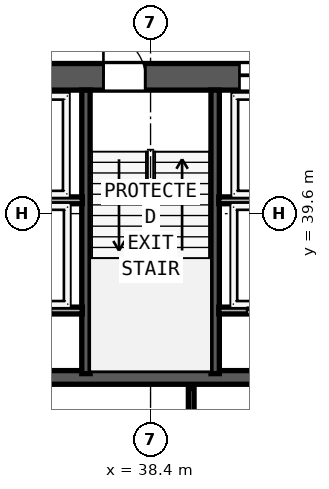
"""IFC4 building model, lengths in metres.
Left out: names, types, materials, properties, quantities, classifications, styles, units other than length and angle.
Written with IfcOpenShell. Run it as: python <this file> out.ifc"""

import sys

from ifc_helpers import new_model, si_unit, direction, frame, frame_2d, origin, place, context, subcontext, project, spatial, rectangle, extrude, element, fill, save


model = new_model("IFC4")
c1 = context("Model", 3, precision=1e-05, world=origin(), true_north=direction((0.0, 1.0)))
c2 = subcontext(c1, "Body", "Model", "MODEL_VIEW")
j1 = project(units=[si_unit("LENGTHUNIT", "METRE"), si_unit("PLANEANGLEUNIT", "RADIAN")], contexts=[c1])
p1 = place(None, origin())
s1 = spatial("IfcSite", under=j1, at=p1, CompositionType="ELEMENT")
p2 = place(p1, origin())
s2 = spatial("IfcBuilding", under=s1, at=p2, CompositionType="ELEMENT")
p3 = place(p2, frame((0.0, 0.0, 144.8)))
s3 = spatial("IfcBuildingStorey", under=s2, at=p3, CompositionType="ELEMENT", Elevation=144.8)
p4 = place(p3, frame((29.65, 43.2, 0.0), z_axis=(0.0, 0.0, 1.0), x_axis=(1.0, 0.0, 0.0)))
e1 = element("IfcWall", 1, at=p4, inside=s3, PredefinedType="SHEAR", context=c2, shape_type="SweptSolid", body=[
    extrude(rectangle(XDim=17.5, YDim=0.7, at=frame_2d((8.75, 0.0))), origin(), (0.0, 0.0, 1.0), 3.6),
])
p5 = place(p4, frame((2.4, 0.0, 0.0)))
e2 = element("IfcOpeningElement", 2, at=p5, cuts=e1, PredefinedType="OPENING", context=c2, shape_type="SweptSolid", body=[
    extrude(rectangle(XDim=1.1, YDim=2.15, at=frame_2d((0.55, 1.075))), frame((0.0, 0.36, 0.0), z_axis=(0.0, -1.0, 0.0), x_axis=(1.0, 0.0, 0.0)), (0.0, 0.0, 1.0), 0.72),
])
p6 = place(p4, frame((7.51, 0.0, 0.0)))
e3 = element("IfcOpeningElement", 3, at=p6, cuts=e1, PredefinedType="OPENING", context=c2, shape_type="SweptSolid", body=[
    extrude(rectangle(XDim=1.1, YDim=2.15, at=frame_2d((0.55, 1.075))), frame((0.0, 0.36, 0.0), z_axis=(0.0, -1.0, 0.0), x_axis=(1.0, 0.0, 0.0)), (0.0, 0.0, 1.0), 0.72),
])
p7 = place(p4, frame((13.6, 0.0, 0.0)))
e4 = element("IfcOpeningElement", 4, at=p7, cuts=e1, PredefinedType="OPENING", context=c2, shape_type="SweptSolid", body=[
    extrude(rectangle(XDim=1.1, YDim=2.15, at=frame_2d((0.55, 1.075))), frame((0.0, 0.36, 0.0), z_axis=(0.0, -1.0, 0.0), x_axis=(1.0, 0.0, 0.0)), (0.0, 0.0, 1.0), 0.72),
])
p8 = place(p4, frame((4.73, 0.0, 0.0)))
e5 = element("IfcOpeningElement", 5, at=p8, cuts=e1, PredefinedType="OPENING", context=c2, shape_type="SweptSolid", body=[
    extrude(rectangle(XDim=1.1, YDim=2.2, at=frame_2d((0.55, 1.1))), frame((0.0, 0.36, 0.0), z_axis=(0.0, -1.0, 0.0), x_axis=(1.0, 0.0, 0.0)), (0.0, 0.0, 1.0), 0.72),
])
p9 = place(p4, frame((11.09, 0.0, 0.0)))
e6 = element("IfcOpeningElement", 6, at=p9, cuts=e1, PredefinedType="OPENING", context=c2, shape_type="SweptSolid", body=[
    extrude(rectangle(XDim=1.1, YDim=2.2, at=frame_2d((0.55, 1.1))), frame((0.0, 0.36, 0.0), z_axis=(0.0, -1.0, 0.0), x_axis=(1.0, 0.0, 0.0)), (0.0, 0.0, 1.0), 0.72),
])
p10 = place(p3, frame((30.35, 35.29, 0.0), z_axis=(0.0, 0.0, 1.0), x_axis=(1.0, 0.0, 0.0)))
e7 = element("IfcWall", 7, at=p10, inside=s3, PredefinedType="SHEAR", context=c2, shape_type="SweptSolid", body=[
    extrude(rectangle(XDim=16.1, YDim=0.36, at=frame_2d((8.05, 0.0))), origin(), (0.0, 0.0, 1.0), 3.6),
])
p11 = place(p10, frame((5.0, 0.0, 0.0), z_axis=(0.0, 0.0, 1.0), x_axis=(-1.0, 0.0, 0.0)))
e8 = element("IfcOpeningElement", 8, at=p11, cuts=e7, PredefinedType="OPENING", context=c2, shape_type="SweptSolid", body=[
    extrude(rectangle(XDim=0.9, YDim=2.1, at=frame_2d((0.45, 1.05))), frame((0.0, 0.19, 0.0), z_axis=(0.0, -1.0, 0.0), x_axis=(1.0, 0.0, 0.0)), (0.0, 0.0, 1.0), 0.38),
])
p12 = place(p10, frame((12.06, 0.0, 0.0), z_axis=(0.0, 0.0, 1.0), x_axis=(-1.0, 0.0, 0.0)))
e9 = element("IfcOpeningElement", 9, at=p12, cuts=e7, PredefinedType="OPENING", context=c2, shape_type="SweptSolid", body=[
    extrude(rectangle(XDim=0.9, YDim=2.1, at=frame_2d((0.45, 1.05))), frame((0.0, 0.19, 0.0), z_axis=(0.0, -1.0, 0.0), x_axis=(1.0, 0.0, 0.0)), (0.0, 0.0, 1.0), 0.38),
])
for number, where, z_axis, x_axis in (
    (10, (36.7, 35.39, 0.0), (0.0, 0.0, 1.0), (0.0, 1.0, 0.0)),
    (11, (40.1, 35.39, 0.0), (0.0, 0.0, 1.0), (0.0, 1.0, 0.0)),
):
    element("IfcWall", number, at=place(p3, frame(where, z_axis=z_axis, x_axis=x_axis)), inside=s3, PredefinedType="SHEAR", context=c2, shape_type="SweptSolid", body=[
        extrude(rectangle(XDim=7.46, YDim=0.22, at=frame_2d((3.73, 0.0))), origin(), (0.0, 0.0, 1.0), 3.6),
    ])
for number, where, z_axis, x_axis in (
    (12, (33.835, 39.95, 0.0), (0.0, 0.0, 1.0), (1.0, 0.0, 0.0)),
    (13, (40.195, 39.95, 0.0), (0.0, 0.0, 1.0), (1.0, 0.0, 0.0)),
):
    element("IfcWall", number, at=place(p3, frame(where, z_axis=z_axis, x_axis=x_axis)), inside=s3, PredefinedType="SOLIDWALL", context=c2, shape_type="SweptSolid", body=[
        extrude(rectangle(XDim=2.77, YDim=0.18, at=frame_2d((1.385, 0.0))), origin(), (0.0, 0.0, 1.0), 3.6),
    ])
p13 = place(p3, frame((33.835, 37.05, 0.0), z_axis=(0.0, 0.0, 1.0), x_axis=(1.0, 0.0, 0.0)))
e14 = element("IfcWall", 14, at=p13, inside=s3, PredefinedType="SOLIDWALL", context=c2, shape_type="SweptSolid", body=[
    extrude(rectangle(XDim=2.77, YDim=0.18, at=frame_2d((1.385, 0.0))), origin(), (0.0, 0.0, 1.0), 3.6),
])
p14 = place(p13, frame((1.945, 0.0, 0.0), z_axis=(0.0, 0.0, 1.0), x_axis=(-1.0, 0.0, 0.0)))
e15 = element("IfcOpeningElement", 15, at=p14, cuts=e14, PredefinedType="OPENING", context=c2, shape_type="SweptSolid", body=[
    extrude(rectangle(XDim=1.2, YDim=2.2, at=frame_2d((0.6, 1.1))), frame((0.0, 0.1, 0.0), z_axis=(0.0, -1.0, 0.0), x_axis=(1.0, 0.0, 0.0)), (0.0, 0.0, 1.0), 0.2),
])
p15 = place(p3, frame((40.195, 37.05, 0.0), z_axis=(0.0, 0.0, 1.0), x_axis=(1.0, 0.0, 0.0)))
e16 = element("IfcWall", 16, at=p15, inside=s3, PredefinedType="SOLIDWALL", context=c2, shape_type="SweptSolid", body=[
    extrude(rectangle(XDim=2.77, YDim=0.18, at=frame_2d((1.385, 0.0))), origin(), (0.0, 0.0, 1.0), 3.6),
])
p16 = place(p15, frame((1.945, 0.0, 0.0), z_axis=(0.0, 0.0, 1.0), x_axis=(-1.0, 0.0, 0.0)))
e17 = element("IfcOpeningElement", 17, at=p16, cuts=e16, PredefinedType="OPENING", context=c2, shape_type="SweptSolid", body=[
    extrude(rectangle(XDim=1.2, YDim=2.2, at=frame_2d((0.6, 1.1))), frame((0.0, 0.1, 0.0), z_axis=(0.0, -1.0, 0.0), x_axis=(1.0, 0.0, 0.0)), (0.0, 0.0, 1.0), 0.2),
])
p17 = place(p3, frame((39.47, 32.95, 0.0), z_axis=(0.0, 0.0, 1.0), x_axis=(0.0, 1.0, 0.0)))
e18 = element("IfcWall", 18, at=p17, inside=s3, PredefinedType="SOLIDWALL", context=c2, shape_type="SweptSolid", body=[
    extrude(rectangle(XDim=2.05, YDim=0.15, at=frame_2d((1.025, 0.0))), origin(), (0.0, 0.0, 1.0), 3.6),
])
p18 = place(p6, origin())
e19 = element("IfcDoor", 19, at=p18, inside=s3, OperationType="SINGLE_SWING_LEFT", PredefinedType="DOOR", context=c2, shape_type="SweptSolid", body=[
    extrude(rectangle(XDim=1.1, YDim=2.15, at=frame_2d((0.55, 1.075))), frame((0.0, 0.185, 0.0), z_axis=(0.0, -1.0, 0.0), x_axis=(1.0, 0.0, 0.0)), (0.0, 0.0, 1.0), 0.05),
])
fill(e3, e19)
p19 = place(p9, origin())
e20 = element("IfcDoor", 20, at=p19, inside=s3, OperationType="SLIDING_TO_LEFT", PredefinedType="DOOR", context=c2, shape_type="SweptSolid", body=[
    extrude(rectangle(XDim=1.1, YDim=2.2, at=frame_2d((0.55, 1.1))), frame((0.0, 0.185, 0.0), z_axis=(0.0, -1.0, 0.0), x_axis=(1.0, 0.0, 0.0)), (0.0, 0.0, 1.0), 0.05),
])
fill(e6, e20)
p20 = place(p16, origin())
e21 = element("IfcDoor", 21, at=p20, inside=s3, OperationType="SLIDING_TO_RIGHT", PredefinedType="DOOR", context=c2, shape_type="SweptSolid", body=[
    extrude(rectangle(XDim=1.2, YDim=2.2, at=frame_2d((0.6, 1.1))), frame((0.0, 0.025, 0.0), z_axis=(0.0, -1.0, 0.0), x_axis=(1.0, 0.0, 0.0)), (0.0, 0.0, 1.0), 0.05),
])
fill(e17, e21)
save(model, sys.argv[1])
